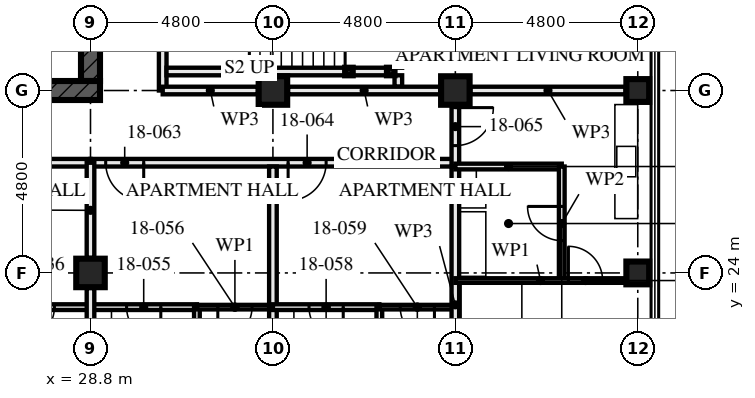
"""IFC4 building model, lengths in metres.
Left out: names, types, materials, properties, quantities, classifications, styles, units other than length and angle.
Written with IfcOpenShell. Run it as: python <this file> out.ifc"""

import sys

from ifc_helpers import new_model, si_unit, direction, frame, frame_2d, origin, origin_2d, place, context, subcontext, project, spatial, rectangle, hollow_rectangle, extrude, element, fill, save


model = new_model("IFC4")
c1 = context("Model", 3, precision=1e-05, world=origin(), true_north=direction((0.0, 1.0)))
c2 = subcontext(c1, "Body", "Model", "MODEL_VIEW")
j1 = project(units=[si_unit("LENGTHUNIT", "METRE"), si_unit("PLANEANGLEUNIT", "RADIAN")], contexts=[c1])
p1 = place(None, origin())
s1 = spatial("IfcSite", under=j1, at=p1, CompositionType="ELEMENT")
p2 = place(p1, origin())
s2 = spatial("IfcBuilding", under=s1, at=p2, CompositionType="ELEMENT")
p3 = place(p2, frame((0.0, 0.0, 69.0)))
s3 = spatial("IfcBuildingStorey", under=s2, at=p3, CompositionType="ELEMENT", Elevation=69.0)
for number, where, z_axis, x_axis in (
    (1, (28.8, 24.0, 0.0), (0.0, 0.0, 1.0), (1.0, 0.0, 0.0)),
    (2, (33.6, 28.8, 0.0), (0.0, 0.0, 1.0), (0.0, 1.0, 0.0)),
    (3, (38.4, 28.8, 0.0), (0.0, 0.0, 1.0), (0.0, 1.0, 0.0)),
):
    element("IfcColumn", number, at=place(p3, frame(where, z_axis=z_axis, x_axis=x_axis)), inside=s3, PredefinedType="COLUMN", context=c2, shape_type="SweptSolid", body=[
        extrude(hollow_rectangle(XDim=0.75, YDim=0.75, WallThickness=0.08, at=origin_2d()), origin(), (0.0, 0.0, 1.0), 3.5),
    ])
for number, where, z_axis, x_axis in (
    (4, (43.2, 24.0, 0.0), (0.0, 0.0, 1.0), (1.0, 0.0, 0.0)),
    (5, (43.2, 28.8, 0.0), (0.0, 0.0, 1.0), (0.0, 1.0, 0.0)),
):
    element("IfcColumn", number, at=place(p3, frame(where, z_axis=z_axis, x_axis=x_axis)), inside=s3, PredefinedType="COLUMN", context=c2, shape_type="SweptSolid", body=[
        extrude(hollow_rectangle(XDim=0.6, YDim=0.6, WallThickness=0.08, at=origin_2d()), origin(), (0.0, 0.0, 1.0), 3.5),
    ])
p4 = place(p3, frame((14.15, 28.8, -0.17), z_axis=(0.0, 0.0, 1.0), x_axis=(1.0, 0.0, 0.0)))
e6 = element("IfcWall", 6, at=p4, inside=s3, PredefinedType="SHEAR", context=c2, shape_type="SweptSolid", body=[
    extrude(rectangle(XDim=14.9, YDim=0.5, at=frame_2d((7.45, 0.0))), origin(), (0.0, 0.0, 1.0), 3.5),
])
p5 = place(p4, frame((6.85, 0.0, 0.17)))
e7 = element("IfcOpeningElement", 7, at=p5, cuts=e6, PredefinedType="OPENING", context=c2, shape_type="SweptSolid", body=[
    extrude(rectangle(XDim=1.2, YDim=2.1, at=frame_2d((0.6, 1.05))), frame((0.0, 0.26, 0.0), z_axis=(0.0, -1.0, 0.0), x_axis=(1.0, 0.0, 0.0)), (0.0, 0.0, 1.0), 0.521),
])
p6 = place(p3, frame((28.8, 29.05, -0.17), z_axis=(0.0, 0.0, 1.0), x_axis=(0.0, 1.0, 0.0)))
e8 = element("IfcWall", 8, at=p6, inside=s3, PredefinedType="SHEAR", context=c2, shape_type="SweptSolid", body=[
    extrude(rectangle(XDim=13.9, YDim=0.5, at=frame_2d((6.95, 0.0))), origin(), (0.0, 0.0, 1.0), 3.5),
])
p7 = place(p6, frame((6.35, 0.0, 0.17)))
e9 = element("IfcOpeningElement", 9, at=p7, cuts=e8, PredefinedType="OPENING", context=c2, shape_type="SweptSolid", body=[
    extrude(rectangle(XDim=1.2, YDim=2.1, at=frame_2d((0.6, 1.05))), frame((0.0, 0.26, 0.0), z_axis=(0.0, -1.0, 0.0), x_axis=(1.0, 0.0, 0.0)), (0.0, 0.0, 1.0), 0.521),
])
for number, where, z_axis, x_axis in (
    (10, (36.7, 29.3, 0.0), (0.0, 0.0, 1.0), (1.0, 0.0, 0.0)),
    (11, (35.6, 29.3, 0.0), (0.0, 0.0, 1.0), (1.0, 0.0, 0.0)),
):
    element("IfcColumn", number, at=place(p3, frame(where, z_axis=z_axis, x_axis=x_axis)), inside=s3, PredefinedType="COLUMN", context=c2, shape_type="SweptSolid", body=[
        extrude(hollow_rectangle(XDim=0.2, YDim=0.2, WallThickness=0.008, at=origin_2d()), origin(), (0.0, 0.0, 1.0), 3.33),
    ])
p8 = place(p3, frame((26.0, 23.1, 0.0), z_axis=(0.0, 0.0, 1.0), x_axis=(1.0, 0.0, 0.0)))
e12 = element("IfcWall", 12, at=p8, inside=s3, PredefinedType="PARTITIONING", context=c2, shape_type="SweptSolid", body=[
    extrude(rectangle(XDim=2.8, YDim=0.15, at=frame_2d((1.4, 0.0))), origin(), (0.0, 0.0, 1.0), 3.33),
])
p9 = place(p8, frame((0.95, 0.0, 0.0)))
e13 = element("IfcOpeningElement", 13, at=p9, cuts=e12, PredefinedType="OPENING", context=c2, shape_type="SweptSolid", body=[
    extrude(rectangle(XDim=0.9, YDim=2.1, at=frame_2d((0.45, 1.05))), frame((0.0, 0.085, 0.0), z_axis=(0.0, -1.0, 0.0), x_axis=(1.0, 0.0, 0.0)), (0.0, 0.0, 1.0), 0.171),
])
p10 = place(p3, frame((14.4, 26.9, 0.0), z_axis=(0.0, 0.0, 1.0), x_axis=(1.0, 0.0, 0.0)))
e14 = element("IfcWall", 14, at=p10, inside=s3, PredefinedType="PARTITIONING", context=c2, shape_type="SweptSolid", body=[
    extrude(rectangle(XDim=14.4, YDim=0.2, at=frame_2d((7.2, 0.0))), origin(), (0.0, 0.0, 1.0), 2.55),
])
p11 = place(p10, frame((1.4, 0.0, 0.0)))
e15 = element("IfcOpeningElement", 15, at=p11, cuts=e14, PredefinedType="OPENING", context=c2, shape_type="SweptSolid", body=[
    extrude(rectangle(XDim=1.0, YDim=2.1, at=frame_2d((0.5, 1.05))), frame((0.0, 0.111, 0.0), z_axis=(0.0, -1.0, 0.0), x_axis=(1.0, 0.0, 0.0)), (0.0, 0.0, 1.0), 0.221),
])
p12 = place(p10, frame((3.65, 0.0, 0.0)))
e16 = element("IfcOpeningElement", 16, at=p12, cuts=e14, PredefinedType="OPENING", context=c2, shape_type="SweptSolid", body=[
    extrude(rectangle(XDim=0.9, YDim=2.1, at=frame_2d((0.45, 1.05))), frame((0.0, 0.111, 0.0), z_axis=(0.0, -1.0, 0.0), x_axis=(1.0, 0.0, 0.0)), (0.0, 0.0, 1.0), 0.221),
])
p13 = place(p10, frame((5.2, 0.0, 0.0)))
e17 = element("IfcOpeningElement", 17, at=p13, cuts=e14, PredefinedType="OPENING", context=c2, shape_type="SweptSolid", body=[
    extrude(rectangle(XDim=1.0, YDim=2.1, at=frame_2d((0.5, 1.05))), frame((0.0, 0.111, 0.0), z_axis=(0.0, -1.0, 0.0), x_axis=(1.0, 0.0, 0.0)), (0.0, 0.0, 1.0), 0.221),
])
p14 = place(p10, frame((10.0, 0.0, 0.0)))
e18 = element("IfcOpeningElement", 18, at=p14, cuts=e14, PredefinedType="OPENING", context=c2, shape_type="SweptSolid", body=[
    extrude(rectangle(XDim=1.0, YDim=2.1, at=frame_2d((0.5, 1.05))), frame((0.0, 0.111, 0.0), z_axis=(0.0, -1.0, 0.0), x_axis=(1.0, 0.0, 0.0)), (0.0, 0.0, 1.0), 0.221),
])
p15 = place(p3, frame((31.6, 20.1, 0.0), z_axis=(0.0, 0.0, 1.0), x_axis=(0.0, 1.0, 0.0)))
e19 = element("IfcWall", 19, at=p15, inside=s3, PredefinedType="PARTITIONING", context=c2, shape_type="SweptSolid", body=[
    extrude(rectangle(XDim=3.0, YDim=0.15, at=frame_2d((1.5, 0.0))), origin(), (0.0, 0.0, 1.0), 3.33),
])
p16 = place(p3, frame((28.8, 23.1, 0.0), z_axis=(0.0, 0.0, 1.0), x_axis=(1.0, 0.0, 0.0)))
e20 = element("IfcWall", 20, at=p16, inside=s3, PredefinedType="PARTITIONING", context=c2, shape_type="SweptSolid", body=[
    extrude(rectangle(XDim=2.8, YDim=0.15, at=frame_2d((1.4, 0.0))), origin(), (0.0, 0.0, 1.0), 3.33),
])
p17 = place(p16, frame((0.95, 0.0, 0.0)))
e21 = element("IfcOpeningElement", 21, at=p17, cuts=e20, PredefinedType="OPENING", context=c2, shape_type="SweptSolid", body=[
    extrude(rectangle(XDim=0.9, YDim=2.1, at=frame_2d((0.45, 1.05))), frame((0.0, 0.085, 0.0), z_axis=(0.0, -1.0, 0.0), x_axis=(1.0, 0.0, 0.0)), (0.0, 0.0, 1.0), 0.171),
])
p18 = place(p3, frame((31.6, 23.1, 0.0), z_axis=(0.0, 0.0, 1.0), x_axis=(1.0, 0.0, 0.0)))
e22 = element("IfcWall", 22, at=p18, inside=s3, PredefinedType="PARTITIONING", context=c2, shape_type="SweptSolid", body=[
    extrude(rectangle(XDim=2.0, YDim=0.12, at=frame_2d((1.0, 0.0))), origin(), (0.0, 0.0, 1.0), 3.33),
])
p19 = place(p18, frame((0.55, 0.0, 0.0)))
e23 = element("IfcOpeningElement", 23, at=p19, cuts=e22, PredefinedType="OPENING", context=c2, shape_type="SweptSolid", body=[
    extrude(rectangle(XDim=0.9, YDim=2.1, at=frame_2d((0.45, 1.05))), frame((0.0, 0.071, 0.0), z_axis=(0.0, -1.0, 0.0), x_axis=(1.0, 0.0, 0.0)), (0.0, 0.0, 1.0), 0.141),
])
p20 = place(p3, frame((33.6, 14.72, 0.0), z_axis=(0.0, 0.0, 1.0), x_axis=(0.0, 1.0, 0.0)))
e24 = element("IfcWall", 24, at=p20, inside=s3, PredefinedType="PARTITIONING", context=c2, shape_type="SweptSolid", body=[
    extrude(rectangle(XDim=12.08, YDim=0.2, at=frame_2d((6.04, 0.0))), origin(), (0.0, 0.0, 1.0), 2.55),
])
p21 = place(p3, frame((36.4, 20.1, 0.0), z_axis=(0.0, 0.0, 1.0), x_axis=(0.0, 1.0, 0.0)))
e25 = element("IfcWall", 25, at=p21, inside=s3, PredefinedType="PARTITIONING", context=c2, shape_type="SweptSolid", body=[
    extrude(rectangle(XDim=3.0, YDim=0.15, at=frame_2d((1.5, 0.0))), origin(), (0.0, 0.0, 1.0), 3.33),
])
p22 = place(p3, frame((33.6, 23.1, 0.0), z_axis=(0.0, 0.0, 1.0), x_axis=(1.0, 0.0, 0.0)))
e26 = element("IfcWall", 26, at=p22, inside=s3, PredefinedType="PARTITIONING", context=c2, shape_type="SweptSolid", body=[
    extrude(rectangle(XDim=2.8, YDim=0.15, at=frame_2d((1.4, 0.0))), origin(), (0.0, 0.0, 1.0), 3.33),
])
p23 = place(p22, frame((0.95, 0.0, 0.0)))
e27 = element("IfcOpeningElement", 27, at=p23, cuts=e26, PredefinedType="OPENING", context=c2, shape_type="SweptSolid", body=[
    extrude(rectangle(XDim=0.9, YDim=2.1, at=frame_2d((0.45, 1.05))), frame((0.0, 0.085, 0.0), z_axis=(0.0, -1.0, 0.0), x_axis=(1.0, 0.0, 0.0)), (0.0, 0.0, 1.0), 0.171),
])
p24 = place(p3, frame((36.4, 23.1, 0.0), z_axis=(0.0, 0.0, 1.0), x_axis=(1.0, 0.0, 0.0)))
e28 = element("IfcWall", 28, at=p24, inside=s3, PredefinedType="PARTITIONING", context=c2, shape_type="SweptSolid", body=[
    extrude(rectangle(XDim=2.0, YDim=0.12, at=frame_2d((1.0, 0.0))), origin(), (0.0, 0.0, 1.0), 3.33),
])
p25 = place(p24, frame((0.55, 0.0, 0.0)))
e29 = element("IfcOpeningElement", 29, at=p25, cuts=e28, PredefinedType="OPENING", context=c2, shape_type="SweptSolid", body=[
    extrude(rectangle(XDim=0.9, YDim=2.1, at=frame_2d((0.45, 1.05))), frame((0.0, 0.071, 0.0), z_axis=(0.0, -1.0, 0.0), x_axis=(1.0, 0.0, 0.0)), (0.0, 0.0, 1.0), 0.141),
])
p26 = place(p3, frame((38.4, 19.52, 0.0), z_axis=(0.0, 0.0, 1.0), x_axis=(0.0, 1.0, 0.0)))
e30 = element("IfcWall", 30, at=p26, inside=s3, PredefinedType="PARTITIONING", context=c2, shape_type="SweptSolid", body=[
    extrude(rectangle(XDim=7.28, YDim=0.2, at=frame_2d((3.64, 0.0))), origin(), (0.0, 0.0, 1.0), 2.55),
])
p27 = place(p3, frame((41.2, 23.8, 0.0), z_axis=(0.0, 0.0, 1.0), x_axis=(0.0, 1.0, 0.0)))
e31 = element("IfcWall", 31, at=p27, inside=s3, PredefinedType="PARTITIONING", context=c2, shape_type="SweptSolid", body=[
    extrude(rectangle(XDim=3.0, YDim=0.15, at=frame_2d((1.5, 0.0))), origin(), (0.0, 0.0, 1.0), 2.55),
])
p28 = place(p27, frame((1.05, 0.0, 0.0)))
e32 = element("IfcOpeningElement", 32, at=p28, cuts=e31, PredefinedType="OPENING", context=c2, shape_type="SweptSolid", body=[
    extrude(rectangle(XDim=0.9, YDim=2.1, at=frame_2d((0.45, 1.05))), frame((0.0, 0.085, 0.0), z_axis=(0.0, -1.0, 0.0), x_axis=(1.0, 0.0, 0.0)), (0.0, 0.0, 1.0), 0.171),
])
p29 = place(p3, frame((38.4, 26.8, 0.0), z_axis=(0.0, 0.0, 1.0), x_axis=(1.0, 0.0, 0.0)))
e33 = element("IfcWall", 33, at=p29, inside=s3, PredefinedType="PARTITIONING", context=c2, shape_type="SweptSolid", body=[
    extrude(rectangle(XDim=2.8, YDim=0.15, at=frame_2d((1.4, 0.0))), origin(), (0.0, 0.0, 1.0), 3.33),
])
p30 = place(p3, frame((38.4, 23.8, 0.0), z_axis=(0.0, 0.0, 1.0), x_axis=(1.0, 0.0, 0.0)))
e34 = element("IfcWall", 34, at=p30, inside=s3, PredefinedType="PARTITIONING", context=c2, shape_type="SweptSolid", body=[
    extrude(rectangle(XDim=4.48, YDim=0.12, at=frame_2d((2.24, 0.0))), origin(), (0.0, 0.0, 1.0), 3.33),
])
p31 = place(p30, frame((2.975, 0.0, 0.0)))
e35 = element("IfcOpeningElement", 35, at=p31, cuts=e34, PredefinedType="OPENING", context=c2, shape_type="SweptSolid", body=[
    extrude(rectangle(XDim=0.9, YDim=2.1, at=frame_2d((0.45, 1.05))), frame((0.0, 0.071, 0.0), z_axis=(0.0, -1.0, 0.0), x_axis=(1.0, 0.0, 0.0)), (0.0, 0.0, 1.0), 0.141),
])
p32 = place(p3, frame((28.8, 26.9, 0.0), z_axis=(0.0, 0.0, 1.0), x_axis=(1.0, 0.0, 0.0)))
e36 = element("IfcWall", 36, at=p32, inside=s3, PredefinedType="PARTITIONING", context=c2, shape_type="SweptSolid", body=[
    extrude(rectangle(XDim=9.6, YDim=0.2, at=frame_2d((4.8, 0.0))), origin(), (0.0, 0.0, 1.0), 3.33),
])
p33 = place(p32, frame((0.4, 0.0, 0.0)))
e37 = element("IfcOpeningElement", 37, at=p33, cuts=e36, PredefinedType="OPENING", context=c2, shape_type="SweptSolid", body=[
    extrude(rectangle(XDim=1.0, YDim=2.1, at=frame_2d((0.5, 1.05))), frame((0.0, 0.111, 0.0), z_axis=(0.0, -1.0, 0.0), x_axis=(1.0, 0.0, 0.0)), (0.0, 0.0, 1.0), 0.221),
])
p34 = place(p32, frame((5.2, 0.0, 0.0)))
e38 = element("IfcOpeningElement", 38, at=p34, cuts=e36, PredefinedType="OPENING", context=c2, shape_type="SweptSolid", body=[
    extrude(rectangle(XDim=1.0, YDim=2.1, at=frame_2d((0.5, 1.05))), frame((0.0, 0.111, 0.0), z_axis=(0.0, -1.0, 0.0), x_axis=(1.0, 0.0, 0.0)), (0.0, 0.0, 1.0), 0.221),
])
p35 = place(p3, frame((38.4, 26.8, 0.0), z_axis=(0.0, 0.0, 1.0), x_axis=(0.0, 1.0, 0.0)))
e39 = element("IfcWall", 39, at=p35, inside=s3, PredefinedType="PARTITIONING", context=c2, shape_type="SweptSolid", body=[
    extrude(rectangle(XDim=1.605, YDim=0.2, at=frame_2d((0.802, 0.0))), origin(), (0.0, 0.0, 1.0), 3.33),
])
p36 = place(p35, frame((0.55, 0.0, 0.0)))
e40 = element("IfcOpeningElement", 40, at=p36, cuts=e39, PredefinedType="OPENING", context=c2, shape_type="SweptSolid", body=[
    extrude(rectangle(XDim=1.0, YDim=2.1, at=frame_2d((0.5, 1.05))), frame((0.0, 0.111, 0.0), z_axis=(0.0, -1.0, 0.0), x_axis=(1.0, 0.0, 0.0)), (0.0, 0.0, 1.0), 0.221),
])
p37 = place(p3, frame((36.6, 29.3, 0.0), z_axis=(0.0, 0.0, 1.0), x_axis=(-1.0, 0.0, 0.0)))
e41 = element("IfcWall", 41, at=p37, inside=s3, PredefinedType="SOLIDWALL", context=c2, shape_type="SweptSolid", body=[
    extrude(rectangle(XDim=0.9, YDim=0.2, at=frame_2d((0.45, 0.0))), origin(), (0.0, 0.0, 1.0), 2.99),
])
p38 = place(p3, frame((35.5, 29.3, 0.0), z_axis=(0.0, 0.0, 1.0), x_axis=(-1.0, 0.0, 0.0)))
e42 = element("IfcWall", 42, at=p38, inside=s3, PredefinedType="SOLIDWALL", context=c2, shape_type="SweptSolid", body=[
    extrude(rectangle(XDim=4.7, YDim=0.2, at=frame_2d((2.35, 0.0))), origin(), (0.0, 0.0, 1.0), 2.99),
])
p39 = place(p3, frame((36.9, 28.9, 0.0), z_axis=(0.0, 0.0, 1.0), x_axis=(0.0, 1.0, 0.0)))
e43 = element("IfcWall", 43, at=p39, inside=s3, PredefinedType="SOLIDWALL", context=c2, shape_type="SweptSolid", body=[
    extrude(rectangle(XDim=0.3, YDim=0.2, at=frame_2d((0.15, 0.0))), origin(), (0.0, 0.0, 1.0), 3.33),
])
p40 = place(p3, frame((36.9, 29.4, 0.0), z_axis=(0.0, 0.0, 1.0), x_axis=(0.0, 1.0, 0.0)))
e44 = element("IfcWall", 44, at=p40, inside=s3, PredefinedType="SOLIDWALL", context=c2, shape_type="SweptSolid", body=[
    extrude(rectangle(XDim=2.6, YDim=0.2, at=frame_2d((1.3, 0.0))), origin(), (0.0, 0.0, 1.0), 3.33),
])
p41 = place(p3, frame((30.7, 28.8, 0.0), z_axis=(0.0, 0.0, 1.0), x_axis=(0.0, 1.0, 0.0)))
e45 = element("IfcWall", 45, at=p41, inside=s3, PredefinedType="PARTITIONING", context=c2, shape_type="SweptSolid", body=[
    extrude(rectangle(XDim=14.4, YDim=0.2, at=frame_2d((7.2, 0.0))), origin(), (0.0, 0.0, 1.0), 2.55),
])
p42 = place(p41, frame((1.4, 0.0, 0.0)))
e46 = element("IfcOpeningElement", 46, at=p42, cuts=e45, PredefinedType="OPENING", context=c2, shape_type="SweptSolid", body=[
    extrude(rectangle(XDim=1.0, YDim=2.1, at=frame_2d((0.5, 1.05))), frame((0.0, 0.111, 0.0), z_axis=(0.0, -1.0, 0.0), x_axis=(1.0, 0.0, 0.0)), (0.0, 0.0, 1.0), 0.221),
])
p43 = place(p41, frame((4.1, 0.0, 0.0)))
e47 = element("IfcOpeningElement", 47, at=p43, cuts=e45, PredefinedType="OPENING", context=c2, shape_type="SweptSolid", body=[
    extrude(rectangle(XDim=1.0, YDim=2.1, at=frame_2d((0.5, 1.05))), frame((0.0, 0.111, 0.0), z_axis=(0.0, -1.0, 0.0), x_axis=(1.0, 0.0, 0.0)), (0.0, 0.0, 1.0), 0.221),
])
p44 = place(p41, frame((5.975, 0.0, 0.0)))
e48 = element("IfcOpeningElement", 48, at=p44, cuts=e45, PredefinedType="OPENING", context=c2, shape_type="SweptSolid", body=[
    extrude(rectangle(XDim=1.0, YDim=2.1, at=frame_2d((0.5, 1.05))), frame((0.0, 0.111, 0.0), z_axis=(0.0, -1.0, 0.0), x_axis=(1.0, 0.0, 0.0)), (0.0, 0.0, 1.0), 0.221),
])
p45 = place(p41, frame((10.0, 0.0, 0.0)))
e49 = element("IfcOpeningElement", 49, at=p45, cuts=e45, PredefinedType="OPENING", context=c2, shape_type="SweptSolid", body=[
    extrude(rectangle(XDim=1.0, YDim=2.1, at=frame_2d((0.5, 1.05))), frame((0.0, 0.111, 0.0), z_axis=(0.0, -1.0, 0.0), x_axis=(1.0, 0.0, 0.0)), (0.0, 0.0, 1.0), 0.221),
])
p46 = place(p3, frame((28.8, 19.595, 0.0), z_axis=(0.0, 0.0, 1.0), x_axis=(0.0, 1.0, 0.0)))
e50 = element("IfcWall", 50, at=p46, inside=s3, PredefinedType="PARTITIONING", context=c2, shape_type="SweptSolid", body=[
    extrude(rectangle(XDim=4.01, YDim=0.2, at=frame_2d((2.005, 0.0))), origin(), (0.0, 0.0, 1.0), 2.32),
])
p47 = place(p3, frame((28.8, 24.395, 0.0), z_axis=(0.0, 0.0, 1.0), x_axis=(0.0, 1.0, 0.0)))
e51 = element("IfcWall", 51, at=p47, inside=s3, PredefinedType="PARTITIONING", context=c2, shape_type="SweptSolid", body=[
    extrude(rectangle(XDim=2.505, YDim=0.2, at=frame_2d((1.252, 0.0))), origin(), (0.0, 0.0, 1.0), 2.32),
])
p48 = place(p3, frame((42.88, 28.8, 0.0), z_axis=(0.0, 0.0, 1.0), x_axis=(-1.0, 0.0, 0.0)))
e52 = element("IfcWall", 52, at=p48, inside=s3, PredefinedType="PARTITIONING", context=c2, shape_type="SweptSolid", body=[
    extrude(rectangle(XDim=4.085, YDim=0.2, at=frame_2d((2.042, 0.0))), origin(), (0.0, 0.0, 1.0), 2.32),
])
p49 = place(p3, frame((38.005, 28.8, 0.0), z_axis=(0.0, 0.0, 1.0), x_axis=(-1.0, 0.0, 0.0)))
e53 = element("IfcWall", 53, at=p49, inside=s3, PredefinedType="PARTITIONING", context=c2, shape_type="SweptSolid", body=[
    extrude(rectangle(XDim=4.01, YDim=0.2, at=frame_2d((2.005, 0.0))), origin(), (0.0, 0.0, 1.0), 2.32),
])
p50 = place(p3, frame((33.205, 28.8, 0.0), z_axis=(0.0, 0.0, 1.0), x_axis=(-1.0, 0.0, 0.0)))
e54 = element("IfcWall", 54, at=p50, inside=s3, PredefinedType="PARTITIONING", context=c2, shape_type="SweptSolid", body=[
    extrude(rectangle(XDim=2.505, YDim=0.2, at=frame_2d((1.252, 0.0))), origin(), (0.0, 0.0, 1.0), 2.32),
])
p51 = place(p9, frame((0.9, 0.0, 0.0), z_axis=(0.0, 0.0, 1.0), x_axis=(-1.0, 0.0, 0.0)))
e55 = element("IfcDoor", 55, at=p51, inside=s3, OperationType="SINGLE_SWING_LEFT", PredefinedType="DOOR", context=c2, shape_type="SweptSolid", body=[
    extrude(rectangle(XDim=0.9, YDim=2.1, at=frame_2d((0.45, 1.05))), frame((0.0, 0.022, 0.0), z_axis=(0.0, -1.0, 0.0), x_axis=(1.0, 0.0, 0.0)), (0.0, 0.0, 1.0), 0.044),
])
fill(e13, e55)
p52 = place(p17, frame((0.9, 0.0, 0.0), z_axis=(0.0, 0.0, 1.0), x_axis=(-1.0, 0.0, 0.0)))
e56 = element("IfcDoor", 56, at=p52, inside=s3, OperationType="SINGLE_SWING_RIGHT", PredefinedType="DOOR", context=c2, shape_type="SweptSolid", body=[
    extrude(rectangle(XDim=0.9, YDim=2.1, at=frame_2d((0.45, 1.05))), frame((0.0, 0.022, 0.0), z_axis=(0.0, -1.0, 0.0), x_axis=(1.0, 0.0, 0.0)), (0.0, 0.0, 1.0), 0.044),
])
fill(e21, e56)
p53 = place(p19, frame((0.9, 0.0, 0.0), z_axis=(0.0, 0.0, 1.0), x_axis=(-1.0, 0.0, 0.0)))
e57 = element("IfcDoor", 57, at=p53, inside=s3, OperationType="SINGLE_SWING_LEFT", PredefinedType="DOOR", context=c2, shape_type="SweptSolid", body=[
    extrude(rectangle(XDim=0.9, YDim=2.1, at=frame_2d((0.45, 1.05))), frame((0.0, 0.022, 0.0), z_axis=(0.0, -1.0, 0.0), x_axis=(1.0, 0.0, 0.0)), (0.0, 0.0, 1.0), 0.044),
])
fill(e23, e57)
p54 = place(p23, frame((0.9, 0.0, 0.0), z_axis=(0.0, 0.0, 1.0), x_axis=(-1.0, 0.0, 0.0)))
e58 = element("IfcDoor", 58, at=p54, inside=s3, OperationType="SINGLE_SWING_RIGHT", PredefinedType="DOOR", context=c2, shape_type="SweptSolid", body=[
    extrude(rectangle(XDim=0.9, YDim=2.1, at=frame_2d((0.45, 1.05))), frame((0.0, 0.022, 0.0), z_axis=(0.0, -1.0, 0.0), x_axis=(1.0, 0.0, 0.0)), (0.0, 0.0, 1.0), 0.044),
])
fill(e27, e58)
p55 = place(p25, frame((0.9, 0.0, 0.0), z_axis=(0.0, 0.0, 1.0), x_axis=(-1.0, 0.0, 0.0)))
e59 = element("IfcDoor", 59, at=p55, inside=s3, OperationType="SINGLE_SWING_RIGHT", PredefinedType="DOOR", context=c2, shape_type="SweptSolid", body=[
    extrude(rectangle(XDim=0.9, YDim=2.1, at=frame_2d((0.45, 1.05))), frame((0.0, 0.022, 0.0), z_axis=(0.0, -1.0, 0.0), x_axis=(1.0, 0.0, 0.0)), (0.0, 0.0, 1.0), 0.044),
])
fill(e29, e59)
p56 = place(p28, origin())
e60 = element("IfcDoor", 60, at=p56, inside=s3, OperationType="SINGLE_SWING_LEFT", PredefinedType="DOOR", context=c2, shape_type="SweptSolid", body=[
    extrude(rectangle(XDim=0.9, YDim=2.1, at=frame_2d((0.45, 1.05))), frame((0.0, 0.022, 0.0), z_axis=(0.0, -1.0, 0.0), x_axis=(1.0, 0.0, 0.0)), (0.0, 0.0, 1.0), 0.044),
])
fill(e32, e60)
p57 = place(p31, origin())
e61 = element("IfcDoor", 61, at=p57, inside=s3, OperationType="SINGLE_SWING_RIGHT", PredefinedType="DOOR", context=c2, shape_type="SweptSolid", body=[
    extrude(rectangle(XDim=0.9, YDim=2.1, at=frame_2d((0.45, 1.05))), frame((0.0, 0.022, 0.0), z_axis=(0.0, -1.0, 0.0), x_axis=(1.0, 0.0, 0.0)), (0.0, 0.0, 1.0), 0.044),
])
fill(e35, e61)
p58 = place(p33, frame((1.0, 0.0, 0.0), z_axis=(0.0, 0.0, 1.0), x_axis=(-1.0, 0.0, 0.0)))
e62 = element("IfcDoor", 62, at=p58, inside=s3, OperationType="SINGLE_SWING_RIGHT", PredefinedType="DOOR", context=c2, shape_type="SweptSolid", body=[
    extrude(rectangle(XDim=1.0, YDim=2.1, at=frame_2d((0.5, 1.05))), frame((0.0, 0.027, 0.0), z_axis=(0.0, -1.0, 0.0), x_axis=(1.0, 0.0, 0.0)), (0.0, 0.0, 1.0), 0.054),
])
fill(e37, e62)
p59 = place(p34, frame((1.0, 0.0, 0.0), z_axis=(0.0, 0.0, 1.0), x_axis=(-1.0, 0.0, 0.0)))
e63 = element("IfcDoor", 63, at=p59, inside=s3, OperationType="SINGLE_SWING_LEFT", PredefinedType="DOOR", context=c2, shape_type="SweptSolid", body=[
    extrude(rectangle(XDim=1.0, YDim=2.1, at=frame_2d((0.5, 1.05))), frame((0.0, 0.027, 0.0), z_axis=(0.0, -1.0, 0.0), x_axis=(1.0, 0.0, 0.0)), (0.0, 0.0, 1.0), 0.054),
])
fill(e38, e63)
p60 = place(p36, frame((1.0, 0.0, 0.0), z_axis=(0.0, 0.0, 1.0), x_axis=(-1.0, 0.0, 0.0)))
e64 = element("IfcDoor", 64, at=p60, inside=s3, OperationType="SINGLE_SWING_RIGHT", PredefinedType="DOOR", context=c2, shape_type="SweptSolid", body=[
    extrude(rectangle(XDim=1.0, YDim=2.1, at=frame_2d((0.5, 1.05))), frame((0.0, 0.027, 0.0), z_axis=(0.0, -1.0, 0.0), x_axis=(1.0, 0.0, 0.0)), (0.0, 0.0, 1.0), 0.054),
])
fill(e40, e64)
save(model, sys.argv[1])
